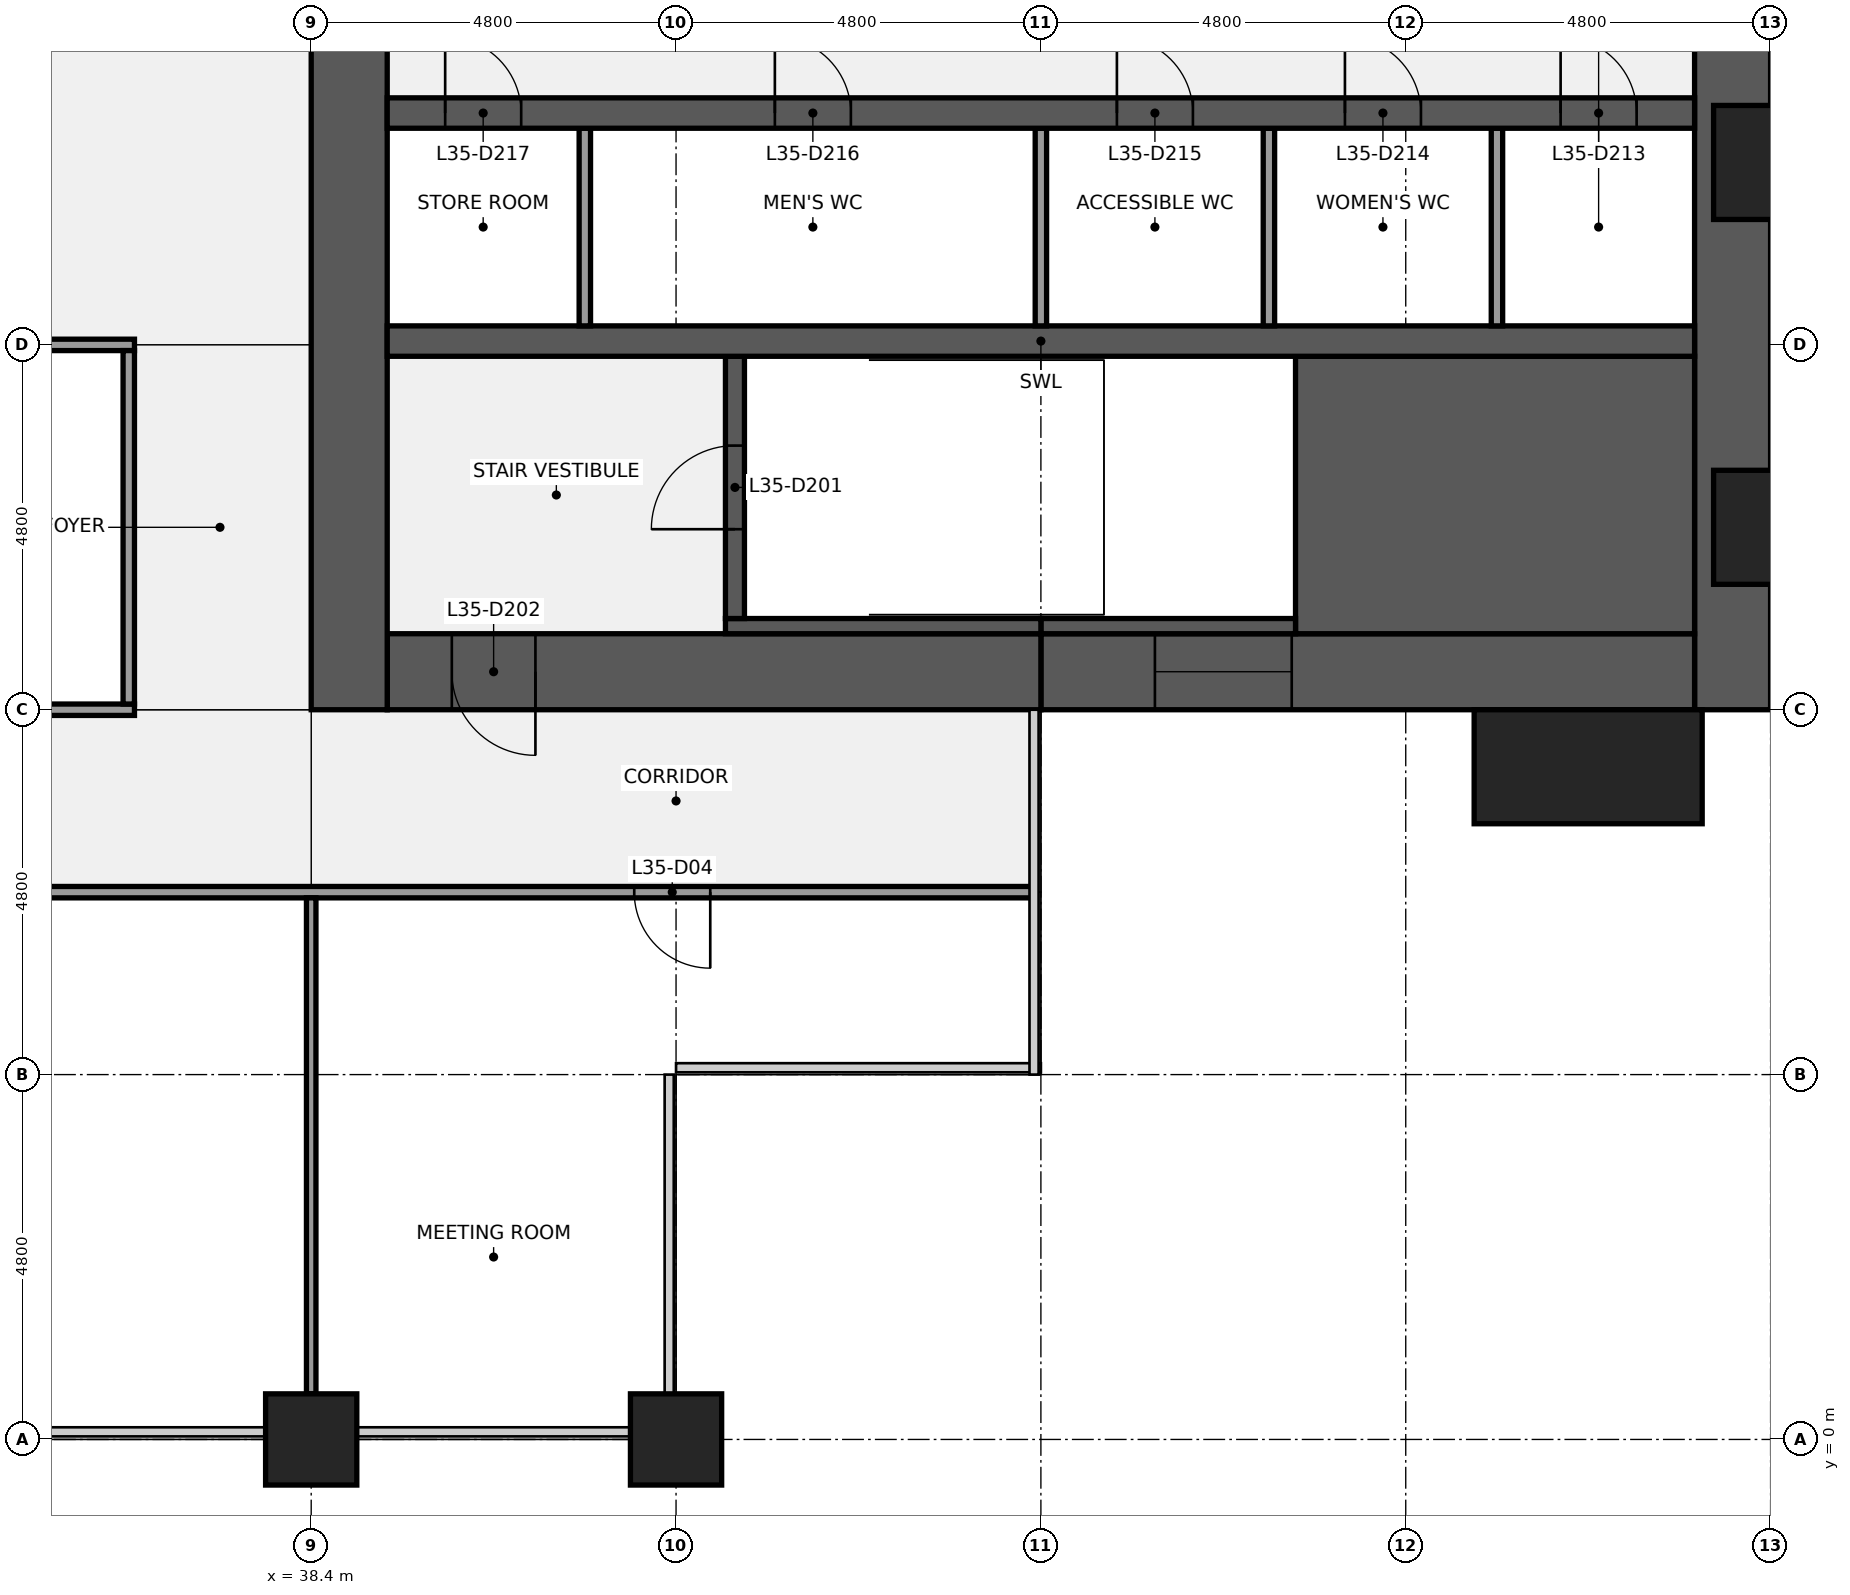
"""IFC4 building model, lengths in metres.
Left out: names, types, materials, properties, quantities, classifications, styles, units other than length and angle.
Written with IfcOpenShell. Run it as: python <this file> out.ifc"""

import sys

from ifc_helpers import new_model, si_unit, direction, frame, frame_2d, origin, origin_2d, place, context, subcontext, project, spatial, rectangle, extrude, element, fill, save


model = new_model("IFC4")
c1 = context("Model", 3, precision=1e-05, world=origin(), true_north=direction((0.0, 1.0)))
c2 = subcontext(c1, "Body", "Model", "MODEL_VIEW")
j1 = project(units=[si_unit("LENGTHUNIT", "METRE"), si_unit("PLANEANGLEUNIT", "RADIAN")], contexts=[c1])
p1 = place(None, origin())
s1 = spatial("IfcSite", under=j1, at=p1, CompositionType="ELEMENT")
p2 = place(p1, origin())
s2 = spatial("IfcBuilding", under=s1, at=p2, CompositionType="ELEMENT")
p3 = place(p2, frame((0.0, 0.0, 160.1)))
s3 = spatial("IfcBuildingStorey", under=s2, at=p3, CompositionType="ELEMENT", Elevation=160.1)
for number, where, z_axis, x_axis in (
    (1, (38.4, 0.0, 0.0), (0.0, 0.0, 1.0), (1.0, 0.0, 0.0)),
    (2, (43.2, 0.0, 0.0), (0.0, 0.0, 1.0), (1.0, 0.0, 0.0)),
):
    element("IfcColumn", number, at=place(p3, frame(where, z_axis=z_axis, x_axis=x_axis)), inside=s3, PredefinedType="COLUMN", context=c2, shape_type="SweptSolid", body=[
        extrude(rectangle(XDim=1.2, YDim=1.2, at=origin_2d()), origin(), (0.0, 0.0, 1.0), 4.0),
    ])
p4 = place(p3, frame((57.1, 38.4, 0.0), z_axis=(0.0, 0.0, 1.0), x_axis=(0.0, -1.0, 0.0)))
e3 = element("IfcWall", 3, at=p4, inside=s3, PredefinedType="SHEAR", context=c2, shape_type="SweptSolid", body=[
    extrude(rectangle(XDim=28.8, YDim=1.0, at=frame_2d((14.4, 0.0))), origin(), (0.0, 0.0, 1.0), 3.84),
])
p5 = place(p4, frame((18.45, 0.0, 0.9)))
e4 = element("IfcOpeningElement", 4, at=p5, cuts=e3, PredefinedType="OPENING", context=c2, shape_type="SweptSolid", body=[
    extrude(rectangle(XDim=1.5, YDim=1.5, at=frame_2d((0.75, 0.75))), frame((0.0, 0.51, 0.0), z_axis=(0.0, -1.0, 0.0), x_axis=(1.0, 0.0, 0.0)), (0.0, 0.0, 1.0), 1.02),
])
p6 = place(p4, frame((8.85, 0.0, 0.9)))
e5 = element("IfcOpeningElement", 5, at=p6, cuts=e3, PredefinedType="OPENING", context=c2, shape_type="SweptSolid", body=[
    extrude(rectangle(XDim=1.5, YDim=1.5, at=frame_2d((0.75, 0.75))), frame((0.0, 0.51, 0.0), z_axis=(0.0, -1.0, 0.0), x_axis=(1.0, 0.0, 0.0)), (0.0, 0.0, 1.0), 1.02),
])
p7 = place(p3, frame((56.6, 10.1, 0.0), z_axis=(0.0, 0.0, 1.0), x_axis=(-1.0, 0.0, 0.0)))
e6 = element("IfcWall", 6, at=p7, inside=s3, PredefinedType="SHEAR", context=c2, shape_type="SweptSolid", body=[
    extrude(rectangle(XDim=8.6, YDim=1.0, at=frame_2d((4.3, 0.0))), origin(), (0.0, 0.0, 1.0), 3.84),
])
p8 = place(p7, frame((5.3, 0.0, 0.9)))
e7 = element("IfcOpeningElement", 7, at=p8, cuts=e6, PredefinedType="OPENING", context=c2, shape_type="SweptSolid", body=[
    extrude(rectangle(XDim=1.8, YDim=1.5, at=frame_2d((0.9, 0.75))), frame((0.0, 0.51, 0.0), z_axis=(0.0, -1.0, 0.0), x_axis=(1.0, 0.0, 0.0)), (0.0, 0.0, 1.0), 1.02),
])
p9 = place(p3, frame((48.0, 10.1, 0.0), z_axis=(0.0, 0.0, 1.0), x_axis=(-1.0, 0.0, 0.0)))
e8 = element("IfcWall", 8, at=p9, inside=s3, PredefinedType="SHEAR", context=c2, shape_type="SweptSolid", body=[
    extrude(rectangle(XDim=8.6, YDim=1.0, at=frame_2d((4.3, 0.0))), origin(), (0.0, 0.0, 1.0), 3.84),
])
p10 = place(p9, frame((6.65, 0.0, 0.0)))
e9 = element("IfcOpeningElement", 9, at=p10, cuts=e8, PredefinedType="OPENING", context=c2, shape_type="SweptSolid", body=[
    extrude(rectangle(XDim=1.1, YDim=2.1, at=frame_2d((0.55, 1.05))), frame((0.0, 0.51, 0.0), z_axis=(0.0, -1.0, 0.0), x_axis=(1.0, 0.0, 0.0)), (0.0, 0.0, 1.0), 1.02),
])
p11 = place(p3, frame((38.9, 9.6, 0.0), z_axis=(0.0, 0.0, 1.0), x_axis=(0.0, 1.0, 0.0)))
e10 = element("IfcWall", 10, at=p11, inside=s3, PredefinedType="SHEAR", context=c2, shape_type="SweptSolid", body=[
    extrude(rectangle(XDim=28.8, YDim=1.0, at=frame_2d((14.4, 0.0))), origin(), (0.0, 0.0, 1.0), 3.84),
])
p12 = place(p11, frame((8.7, 0.0, 0.0)))
e11 = element("IfcOpeningElement", 11, at=p12, cuts=e10, PredefinedType="OPENING", context=c2, shape_type="SweptSolid", body=[
    extrude(rectangle(XDim=1.8, YDim=2.1, at=frame_2d((0.9, 1.05))), frame((0.0, 0.51, 0.0), z_axis=(0.0, -1.0, 0.0), x_axis=(1.0, 0.0, 0.0)), (0.0, 0.0, 1.0), 1.02),
])
p13 = place(p11, frame((18.3, 0.0, 0.0)))
e12 = element("IfcOpeningElement", 12, at=p13, cuts=e10, PredefinedType="OPENING", context=c2, shape_type="SweptSolid", body=[
    extrude(rectangle(XDim=1.8, YDim=2.1, at=frame_2d((0.9, 1.05))), frame((0.0, 0.51, 0.0), z_axis=(0.0, -1.0, 0.0), x_axis=(1.0, 0.0, 0.0)), (0.0, 0.0, 1.0), 1.02),
])
p14 = place(p3, frame((51.35, 12.425, 0.0), z_axis=(0.0, 0.0, 1.0), x_axis=(1.0, 0.0, 0.0)))
e13 = element("IfcWall", 13, at=p14, inside=s3, PredefinedType="SHEAR", context=c2, shape_type="SweptSolid", body=[
    extrude(rectangle(XDim=5.25, YDim=3.65, at=frame_2d((2.625, 0.0))), origin(), (0.0, 0.0, 1.0), 3.84),
])
p15 = place(p3, frame((48.0, 10.7, 0.0), z_axis=(0.0, 0.0, 1.0), x_axis=(1.0, 0.0, 0.0)))
e14 = element("IfcWall", 14, at=p15, inside=s3, PredefinedType="SHEAR", context=c2, shape_type="SweptSolid", body=[
    extrude(rectangle(XDim=3.35, YDim=0.2, at=frame_2d((1.675, 0.0))), origin(), (0.0, 0.0, 1.0), 3.84),
])
p16 = place(p3, frame((43.85, 10.7, 0.0), z_axis=(0.0, 0.0, 1.0), x_axis=(1.0, 0.0, 0.0)))
e15 = element("IfcWall", 15, at=p16, inside=s3, PredefinedType="SHEAR", context=c2, shape_type="SweptSolid", body=[
    extrude(rectangle(XDim=4.15, YDim=0.2, at=frame_2d((2.075, 0.0))), origin(), (0.0, 0.0, 1.0), 3.84),
])
p17 = place(p3, frame((43.975, 10.8, 0.0), z_axis=(0.0, 0.0, 1.0), x_axis=(0.0, 1.0, 0.0)))
e16 = element("IfcWall", 16, at=p17, inside=s3, PredefinedType="SHEAR", context=c2, shape_type="SweptSolid", body=[
    extrude(rectangle(XDim=3.45, YDim=0.25, at=frame_2d((1.725, 0.0))), origin(), (0.0, 0.0, 1.0), 3.84),
])
p18 = place(p17, frame((1.175, 0.0, 0.0)))
e17 = element("IfcOpeningElement", 17, at=p18, cuts=e16, PredefinedType="OPENING", context=c2, shape_type="SweptSolid", body=[
    extrude(rectangle(XDim=1.1, YDim=2.1, at=frame_2d((0.55, 1.05))), frame((0.0, 0.135, 0.0), z_axis=(0.0, -1.0, 0.0), x_axis=(1.0, 0.0, 0.0)), (0.0, 0.0, 1.0), 0.27),
])
p19 = place(p3, frame((39.4, 14.45, 0.0), z_axis=(0.0, 0.0, 1.0), x_axis=(1.0, 0.0, 0.0)))
e18 = element("IfcWall", 18, at=p19, inside=s3, PredefinedType="SHEAR", context=c2, shape_type="SweptSolid", body=[
    extrude(rectangle(XDim=17.2, YDim=0.4, at=frame_2d((8.6, 0.0))), origin(), (0.0, 0.0, 1.0), 3.84),
])
for number, where, z_axis, x_axis in (
    (19, (54.0, 14.65, 0.0), (0.0, 0.0, 1.0), (0.0, 1.0, 0.0)),
    (20, (51.0, 14.65, 0.0), (0.0, 0.0, 1.0), (0.0, 1.0, 0.0)),
    (21, (48.0, 14.65, 0.0), (0.0, 0.0, 1.0), (0.0, 1.0, 0.0)),
    (22, (42.0, 14.65, 0.0), (0.0, 0.0, 1.0), (0.0, 1.0, 0.0)),
):
    element("IfcWall", number, at=place(p3, frame(where, z_axis=z_axis, x_axis=x_axis)), inside=s3, PredefinedType="PARTITIONING", context=c2, shape_type="SweptSolid", body=[
        extrude(rectangle(XDim=2.6, YDim=0.15, at=frame_2d((1.3, 0.0))), origin(), (0.0, 0.0, 1.0), 3.84),
    ])
p20 = place(p3, frame((39.4, 17.45, 0.0), z_axis=(0.0, 0.0, 1.0), x_axis=(1.0, 0.0, 0.0)))
e23 = element("IfcWall", 23, at=p20, inside=s3, PredefinedType="SHEAR", context=c2, shape_type="SweptSolid", body=[
    extrude(rectangle(XDim=17.2, YDim=0.4, at=frame_2d((8.6, 0.0))), origin(), (0.0, 0.0, 1.0), 3.84),
])
p21 = place(p20, frame((15.438, 0.0, 0.0)))
e24 = element("IfcOpeningElement", 24, at=p21, cuts=e23, PredefinedType="OPENING", context=c2, shape_type="SweptSolid", body=[
    extrude(rectangle(XDim=1.0, YDim=2.1, at=frame_2d((0.5, 1.05))), frame((0.0, 0.21, 0.0), z_axis=(0.0, -1.0, 0.0), x_axis=(1.0, 0.0, 0.0)), (0.0, 0.0, 1.0), 0.42),
])
p22 = place(p20, frame((12.6, 0.0, 0.0)))
e25 = element("IfcOpeningElement", 25, at=p22, cuts=e23, PredefinedType="OPENING", context=c2, shape_type="SweptSolid", body=[
    extrude(rectangle(XDim=1.0, YDim=2.1, at=frame_2d((0.5, 1.05))), frame((0.0, 0.21, 0.0), z_axis=(0.0, -1.0, 0.0), x_axis=(1.0, 0.0, 0.0)), (0.0, 0.0, 1.0), 0.42),
])
p23 = place(p20, frame((9.6, 0.0, 0.0)))
e26 = element("IfcOpeningElement", 26, at=p23, cuts=e23, PredefinedType="OPENING", context=c2, shape_type="SweptSolid", body=[
    extrude(rectangle(XDim=1.0, YDim=2.1, at=frame_2d((0.5, 1.05))), frame((0.0, 0.21, 0.0), z_axis=(0.0, -1.0, 0.0), x_axis=(1.0, 0.0, 0.0)), (0.0, 0.0, 1.0), 0.42),
])
p24 = place(p20, frame((5.1, 0.0, 0.0)))
e27 = element("IfcOpeningElement", 27, at=p24, cuts=e23, PredefinedType="OPENING", context=c2, shape_type="SweptSolid", body=[
    extrude(rectangle(XDim=1.0, YDim=2.1, at=frame_2d((0.5, 1.05))), frame((0.0, 0.21, 0.0), z_axis=(0.0, -1.0, 0.0), x_axis=(1.0, 0.0, 0.0)), (0.0, 0.0, 1.0), 0.42),
])
p25 = place(p20, frame((0.762, 0.0, 0.0)))
e28 = element("IfcOpeningElement", 28, at=p25, cuts=e23, PredefinedType="OPENING", context=c2, shape_type="SweptSolid", body=[
    extrude(rectangle(XDim=1.0, YDim=2.1, at=frame_2d((0.5, 1.05))), frame((0.0, 0.21, 0.0), z_axis=(0.0, -1.0, 0.0), x_axis=(1.0, 0.0, 0.0)), (0.0, 0.0, 1.0), 0.42),
])
p26 = place(p3, frame((9.7, 7.2, 0.0), z_axis=(0.0, 0.0, 1.0), x_axis=(1.0, 0.0, 0.0)))
e29 = element("IfcWall", 29, at=p26, inside=s3, PredefinedType="PARTITIONING", context=c2, shape_type="SweptSolid", body=[
    extrude(rectangle(XDim=38.2, YDim=0.15, at=frame_2d((19.1, 0.0))), origin(), (0.0, 0.0, 1.0), 2.849),
])
p27 = place(p26, frame((4.25, 0.0, 0.0)))
e30 = element("IfcOpeningElement", 30, at=p27, cuts=e29, PredefinedType="OPENING", context=c2, shape_type="SweptSolid", body=[
    extrude(rectangle(XDim=1.0, YDim=2.1, at=frame_2d((0.5, 1.05))), frame((0.0, 0.085, 0.0), z_axis=(0.0, -1.0, 0.0), x_axis=(1.0, 0.0, 0.0)), (0.0, 0.0, 1.0), 0.17),
])
p28 = place(p26, frame((13.8, 0.0, 0.0)))
e31 = element("IfcOpeningElement", 31, at=p28, cuts=e29, PredefinedType="OPENING", context=c2, shape_type="SweptSolid", body=[
    extrude(rectangle(XDim=1.0, YDim=2.1, at=frame_2d((0.5, 1.05))), frame((0.0, 0.085, 0.0), z_axis=(0.0, -1.0, 0.0), x_axis=(1.0, 0.0, 0.0)), (0.0, 0.0, 1.0), 0.17),
])
p29 = place(p26, frame((23.4, 0.0, 0.0)))
e32 = element("IfcOpeningElement", 32, at=p29, cuts=e29, PredefinedType="OPENING", context=c2, shape_type="SweptSolid", body=[
    extrude(rectangle(XDim=1.0, YDim=2.1, at=frame_2d((0.5, 1.05))), frame((0.0, 0.085, 0.0), z_axis=(0.0, -1.0, 0.0), x_axis=(1.0, 0.0, 0.0)), (0.0, 0.0, 1.0), 0.17),
])
p30 = place(p26, frame((32.95, 0.0, 0.0)))
e33 = element("IfcOpeningElement", 33, at=p30, cuts=e29, PredefinedType="OPENING", context=c2, shape_type="SweptSolid", body=[
    extrude(rectangle(XDim=1.0, YDim=2.1, at=frame_2d((0.5, 1.05))), frame((0.0, 0.085, 0.0), z_axis=(0.0, -1.0, 0.0), x_axis=(1.0, 0.0, 0.0)), (0.0, 0.0, 1.0), 0.17),
])
p31 = place(p3, frame((21.525, 9.6, 0.0), z_axis=(0.0, 0.0, 1.0), x_axis=(1.0, 0.0, 0.0)))
e34 = element("IfcWall", 34, at=p31, inside=s3, PredefinedType="PARTITIONING", context=c2, shape_type="SweptSolid", body=[
    extrude(rectangle(XDim=14.55, YDim=0.15, at=frame_2d((7.275, 0.0))), origin(), (0.0, 0.0, 1.0), 2.849),
])
p32 = place(p31, frame((9.175, 0.0, 0.0)))
e35 = element("IfcOpeningElement", 35, at=p32, cuts=e34, PredefinedType="OPENING", context=c2, shape_type="SweptSolid", body=[
    extrude(rectangle(XDim=1.0, YDim=2.1, at=frame_2d((0.5, 1.05))), frame((0.0, 0.085, 0.0), z_axis=(0.0, -1.0, 0.0), x_axis=(1.0, 0.0, 0.0)), (0.0, 0.0, 1.0), 0.17),
])
p33 = place(p3, frame((31.275, 14.4, 0.0), z_axis=(0.0, 0.0, 1.0), x_axis=(1.0, 0.0, 0.0)))
e36 = element("IfcWall", 36, at=p33, inside=s3, PredefinedType="PARTITIONING", context=c2, shape_type="SweptSolid", body=[
    extrude(rectangle(XDim=4.8, YDim=0.15, at=frame_2d((2.4, 0.0))), origin(), (0.0, 0.0, 1.0), 2.849),
])
p34 = place(p3, frame((36.0, 9.675, 0.0), z_axis=(0.0, 0.0, 1.0), x_axis=(0.0, 1.0, 0.0)))
e37 = element("IfcWall", 37, at=p34, inside=s3, PredefinedType="PARTITIONING", context=c2, shape_type="SweptSolid", body=[
    extrude(rectangle(XDim=4.65, YDim=0.15, at=frame_2d((2.325, 0.0))), origin(), (0.0, 0.0, 1.0), 2.849),
])
p35 = place(p3, frame((38.4, 0.6, 0.0), z_axis=(0.0, 0.0, 1.0), x_axis=(0.0, 1.0, 0.0)))
e38 = element("IfcWall", 38, at=p35, inside=s3, PredefinedType="PARTITIONING", context=c2, shape_type="SweptSolid", body=[
    extrude(rectangle(XDim=6.525, YDim=0.125, at=frame_2d((3.262, 0.0))), origin(), (0.0, 0.0, 1.0), 2.849),
])
p36 = place(p3, frame((55.2, 8.85, 0.0), z_axis=(0.0, 0.0, 1.0), x_axis=(1.0, 0.0, 0.0)))
e39 = element("IfcColumn", 39, at=p36, inside=s3, PredefinedType="PILASTER", context=c2, shape_type="SweptSolid", body=[
    extrude(rectangle(XDim=3.0, YDim=1.5, at=origin_2d()), origin(), (0.0, 0.0, 1.0), 4.0),
])
for number, where, z_axis, x_axis in (
    (40, (38.4, -1.05, 0.0), (0.0, 0.0, 1.0), (1.0, 0.0, 0.0)),
    (41, (43.2, -1.05, 0.0), (0.0, 0.0, 1.0), (1.0, 0.0, 0.0)),
):
    element("IfcColumn", number, at=place(p3, frame(where, z_axis=z_axis, x_axis=x_axis)), inside=s3, PredefinedType="PILASTER", context=c2, shape_type="SweptSolid", body=[
        extrude(rectangle(XDim=3.6, YDim=0.9, at=origin_2d()), origin(), (0.0, 0.0, 1.0), 4.0),
    ])
p37 = place(p18, origin())
e42 = element("IfcDoor", 42, at=p37, inside=s3, OperationType="SINGLE_SWING_LEFT", PredefinedType="DOOR", context=c2, shape_type="SweptSolid", body=[
    extrude(rectangle(XDim=1.1, YDim=2.1, at=frame_2d((0.55, 1.05))), frame((0.0, 0.025, 0.0), z_axis=(0.0, -1.0, 0.0), x_axis=(1.0, 0.0, 0.0)), (0.0, 0.0, 1.0), 0.05),
])
fill(e17, e42)
p38 = place(p10, origin())
e43 = element("IfcDoor", 43, at=p38, inside=s3, OperationType="SINGLE_SWING_LEFT", PredefinedType="DOOR", context=c2, shape_type="SweptSolid", body=[
    extrude(rectangle(XDim=1.1, YDim=2.1, at=frame_2d((0.55, 1.05))), frame((0.0, 0.025, 0.0), z_axis=(0.0, -1.0, 0.0), x_axis=(1.0, 0.0, 0.0)), (0.0, 0.0, 1.0), 0.05),
])
fill(e9, e43)
p39 = place(p21, origin())
e44 = element("IfcDoor", 44, at=p39, inside=s3, OperationType="SINGLE_SWING_LEFT", PredefinedType="DOOR", context=c2, shape_type="SweptSolid", body=[
    extrude(rectangle(XDim=1.0, YDim=2.1, at=frame_2d((0.5, 1.05))), frame((0.0, 0.025, 0.0), z_axis=(0.0, -1.0, 0.0), x_axis=(1.0, 0.0, 0.0)), (0.0, 0.0, 1.0), 0.05),
])
fill(e24, e44)
p40 = place(p22, origin())
e45 = element("IfcDoor", 45, at=p40, inside=s3, OperationType="SINGLE_SWING_LEFT", PredefinedType="DOOR", context=c2, shape_type="SweptSolid", body=[
    extrude(rectangle(XDim=1.0, YDim=2.1, at=frame_2d((0.5, 1.05))), frame((0.0, 0.025, 0.0), z_axis=(0.0, -1.0, 0.0), x_axis=(1.0, 0.0, 0.0)), (0.0, 0.0, 1.0), 0.05),
])
fill(e25, e45)
p41 = place(p23, origin())
e46 = element("IfcDoor", 46, at=p41, inside=s3, OperationType="SINGLE_SWING_LEFT", PredefinedType="DOOR", context=c2, shape_type="SweptSolid", body=[
    extrude(rectangle(XDim=1.0, YDim=2.1, at=frame_2d((0.5, 1.05))), frame((0.0, 0.025, 0.0), z_axis=(0.0, -1.0, 0.0), x_axis=(1.0, 0.0, 0.0)), (0.0, 0.0, 1.0), 0.05),
])
fill(e26, e46)
p42 = place(p24, origin())
e47 = element("IfcDoor", 47, at=p42, inside=s3, OperationType="SINGLE_SWING_LEFT", PredefinedType="DOOR", context=c2, shape_type="SweptSolid", body=[
    extrude(rectangle(XDim=1.0, YDim=2.1, at=frame_2d((0.5, 1.05))), frame((0.0, 0.025, 0.0), z_axis=(0.0, -1.0, 0.0), x_axis=(1.0, 0.0, 0.0)), (0.0, 0.0, 1.0), 0.05),
])
fill(e27, e47)
p43 = place(p25, origin())
e48 = element("IfcDoor", 48, at=p43, inside=s3, OperationType="SINGLE_SWING_LEFT", PredefinedType="DOOR", context=c2, shape_type="SweptSolid", body=[
    extrude(rectangle(XDim=1.0, YDim=2.1, at=frame_2d((0.5, 1.05))), frame((0.0, 0.025, 0.0), z_axis=(0.0, -1.0, 0.0), x_axis=(1.0, 0.0, 0.0)), (0.0, 0.0, 1.0), 0.05),
])
fill(e28, e48)
p44 = place(p8, origin())
e49 = element("IfcWindow", 49, at=p44, inside=s3, PartitioningType="SINGLE_PANEL", PredefinedType="WINDOW", context=c2, shape_type="SweptSolid", body=[
    extrude(rectangle(XDim=1.8, YDim=1.5, at=frame_2d((0.9, 0.75))), frame((0.0, 0.03, 0.0), z_axis=(0.0, -1.0, 0.0), x_axis=(1.0, 0.0, 0.0)), (0.0, 0.0, 1.0), 0.06),
])
fill(e7, e49)
p45 = place(p30, origin())
e50 = element("IfcDoor", 50, at=p45, inside=s3, OperationType="SINGLE_SWING_RIGHT", PredefinedType="DOOR", context=c2, shape_type="SweptSolid", body=[
    extrude(rectangle(XDim=1.0, YDim=2.1, at=frame_2d((0.5, 1.05))), frame((0.0, 0.025, 0.0), z_axis=(0.0, -1.0, 0.0), x_axis=(1.0, 0.0, 0.0)), (0.0, 0.0, 1.0), 0.05),
])
fill(e33, e50)
save(model, sys.argv[1])
